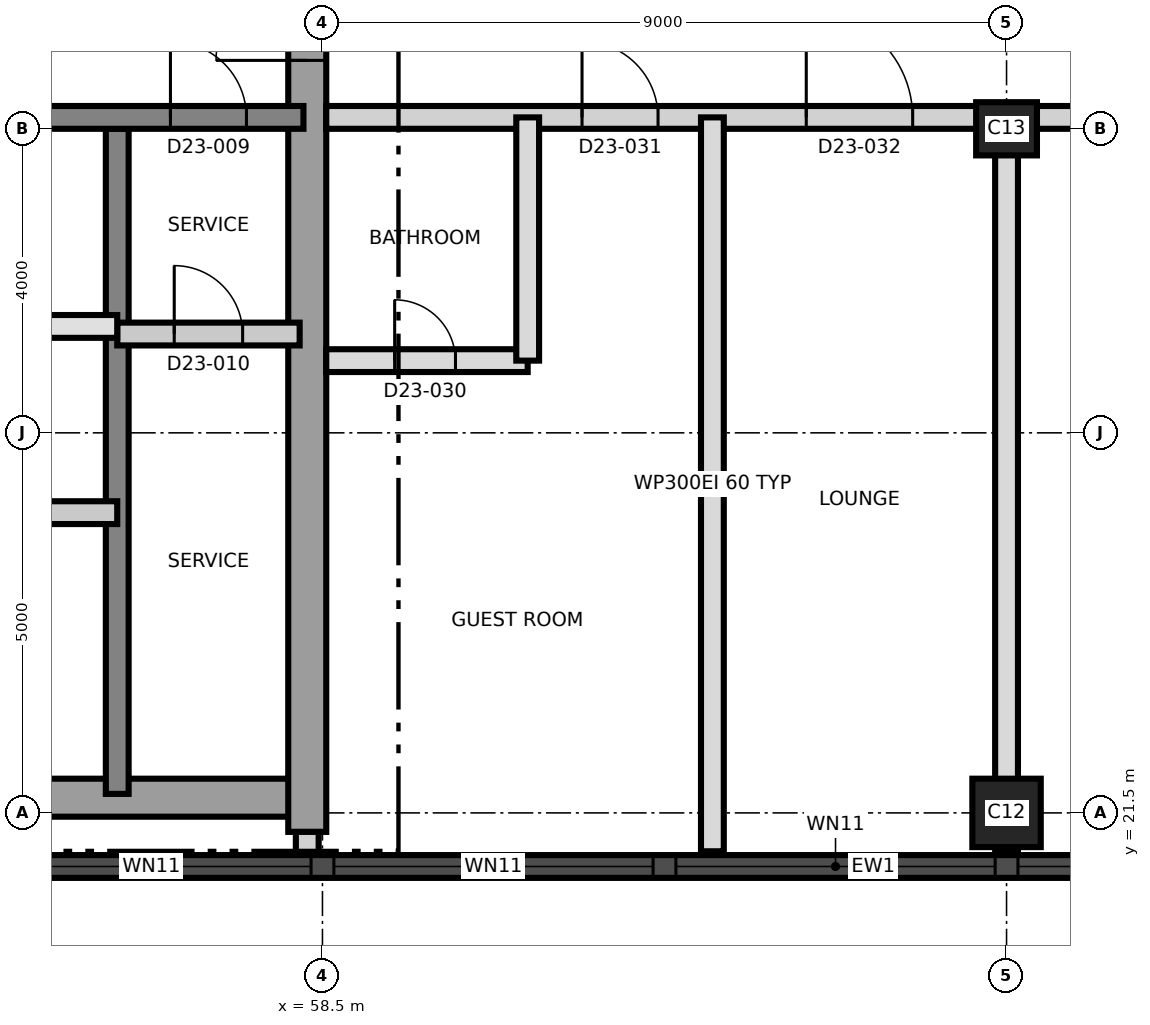
"""IFC4 building model, lengths in metres.
Left out: names, types, materials, properties, quantities, classifications, styles, units other than length and angle.
Written with IfcOpenShell. Run it as: python <this file> out.ifc"""

import sys

from ifc_helpers import new_model, si_unit, direction, frame, frame_2d, origin, origin_2d, place, context, subcontext, project, spatial, rectangle, extrude, element, fill, save


model = new_model("IFC4")
c1 = context("Model", 3, precision=1e-05, world=origin(), true_north=direction((0.0, 1.0)))
c2 = subcontext(c1, "Body", "Model", "MODEL_VIEW")
j1 = project(units=[si_unit("LENGTHUNIT", "METRE"), si_unit("PLANEANGLEUNIT", "RADIAN")], contexts=[c1])
p1 = place(None, origin())
s1 = spatial("IfcSite", under=j1, at=p1, CompositionType="ELEMENT")
p2 = place(p1, origin())
s2 = spatial("IfcBuilding", under=s1, at=p2, CompositionType="ELEMENT")
p3 = place(p2, frame((0.0, 0.0, 210.6)))
s3 = spatial("IfcBuildingStorey", under=s2, at=p3, CompositionType="ELEMENT", Elevation=210.6)
p4 = place(p3, frame((31.25, 21.7, 0.0), z_axis=(0.0, 0.0, 1.0), x_axis=(1.0, 0.0, 0.0)))
e1 = element("IfcWall", 1, at=p4, inside=s3, PredefinedType="SHEAR", context=c2, shape_type="SweptSolid", body=[
    extrude(rectangle(XDim=27.0, YDim=0.5, at=frame_2d((13.5, 0.0))), origin(), (0.0, 0.0, 1.0), 3.7),
])
p5 = place(p3, frame((58.3, 21.25, 0.0), z_axis=(0.0, 0.0, 1.0), x_axis=(0.0, 1.0, 0.0)))
e2 = element("IfcWall", 2, at=p5, inside=s3, PredefinedType="SHEAR", context=c2, shape_type="SweptSolid", body=[
    extrude(rectangle(XDim=18.5, YDim=0.5, at=frame_2d((9.25, 0.0))), origin(), (0.0, 0.0, 1.0), 3.7),
])
p6 = place(p5, frame((10.15, 0.0, 0.0)))
e3 = element("IfcOpeningElement", 3, at=p6, cuts=e2, PredefinedType="OPENING", context=c2, shape_type="SweptSolid", body=[
    extrude(rectangle(XDim=1.2, YDim=2.1, at=frame_2d((0.6, 1.05))), frame((0.0, 0.26, 0.0), z_axis=(0.0, -1.0, 0.0), x_axis=(1.0, 0.0, 0.0)), (0.0, 0.0, 1.0), 0.52),
])
p7 = place(p3, frame((55.8, 21.75, 0.0), z_axis=(0.0, 0.0, 1.0), x_axis=(0.0, 1.0, 0.0)))
e4 = element("IfcWall", 4, at=p7, inside=s3, PredefinedType="SHEAR", context=c2, shape_type="SweptSolid", body=[
    extrude(rectangle(XDim=8.75, YDim=0.3, at=frame_2d((4.375, 0.0))), origin(), (0.0, 0.0, 1.0), 3.7),
])
p8 = place(p3, frame((31.75, 30.65, 0.0), z_axis=(0.0, 0.0, 1.0), x_axis=(1.0, 0.0, 0.0)))
e5 = element("IfcWall", 5, at=p8, inside=s3, PredefinedType="SHEAR", context=c2, shape_type="SweptSolid", body=[
    extrude(rectangle(XDim=26.5, YDim=0.3, at=frame_2d((13.25, 0.0))), origin(), (0.0, 0.0, 1.0), 3.7),
])
p9 = place(p8, frame((24.75, 0.0, 0.0)))
e6 = element("IfcOpeningElement", 6, at=p9, cuts=e5, PredefinedType="OPENING", context=c2, shape_type="SweptSolid", body=[
    extrude(rectangle(XDim=1.0, YDim=2.1, at=frame_2d((0.5, 1.05))), frame((0.0, 0.16, 0.0), z_axis=(0.0, -1.0, 0.0), x_axis=(1.0, 0.0, 0.0)), (0.0, 0.0, 1.0), 0.32),
])
p10 = place(p3, frame((67.5, 21.5, 0.0), z_axis=(0.0, 0.0, 1.0), x_axis=(1.0, 0.0, 0.0)))
e7 = element("IfcColumn", 7, at=p10, inside=s3, PredefinedType="COLUMN", context=c2, shape_type="SweptSolid", body=[
    extrude(rectangle(XDim=0.9, YDim=0.9, at=origin_2d()), origin(), (0.0, 0.0, 1.0), 3.7),
])
p11 = place(p3, frame((67.5, 30.5, 0.0), z_axis=(0.0, 0.0, 1.0), x_axis=(1.0, 0.0, 0.0)))
e8 = element("IfcColumn", 8, at=p11, inside=s3, PredefinedType="COLUMN", context=c2, shape_type="SweptSolid", body=[
    extrude(rectangle(XDim=0.8, YDim=0.7, at=origin_2d()), origin(), (0.0, 0.0, 1.0), 3.7),
])
p12 = place(p3, frame((44.011, 20.795, 0.0), z_axis=(0.0, 0.0, 1.0), x_axis=(1.0, 0.0, 0.0)))
e9 = element("IfcWall", 9, at=p12, inside=s3, PredefinedType="SOLIDWALL", context=c2, shape_type="SweptSolid", body=[
    extrude(rectangle(XDim=43.476, YDim=0.3, at=frame_2d((21.738, 0.0))), origin(), (0.0, 0.0, 1.0), 3.4),
])
p13 = place(p12, frame((1.845, 0.0, 0.3)))
e10 = element("IfcOpeningElement", 10, at=p13, cuts=e9, PredefinedType="OPENING", context=c2, shape_type="SweptSolid", body=[
    extrude(rectangle(XDim=1.8, YDim=2.4, at=frame_2d((0.9, 1.2))), frame((0.0, 0.16, 0.0), z_axis=(0.0, -1.0, 0.0), x_axis=(1.0, 0.0, 0.0)), (0.0, 0.0, 1.0), 0.32),
])
p14 = place(p12, frame((5.639, 0.0, 0.9)))
e11 = element("IfcOpeningElement", 11, at=p14, cuts=e9, PredefinedType="OPENING", context=c2, shape_type="SweptSolid", body=[
    extrude(rectangle(XDim=4.2, YDim=1.5, at=frame_2d((2.1, 0.75))), frame((0.0, 0.16, 0.0), z_axis=(0.0, -1.0, 0.0), x_axis=(1.0, 0.0, 0.0)), (0.0, 0.0, 1.0), 0.32),
])
p15 = place(p12, frame((10.139, 0.0, 0.9)))
e12 = element("IfcOpeningElement", 12, at=p15, cuts=e9, PredefinedType="OPENING", context=c2, shape_type="SweptSolid", body=[
    extrude(rectangle(XDim=4.2, YDim=1.5, at=frame_2d((2.1, 0.75))), frame((0.0, 0.16, 0.0), z_axis=(0.0, -1.0, 0.0), x_axis=(1.0, 0.0, 0.0)), (0.0, 0.0, 1.0), 0.32),
])
p16 = place(p12, frame((14.639, 0.0, 0.9)))
e13 = element("IfcOpeningElement", 13, at=p16, cuts=e9, PredefinedType="OPENING", context=c2, shape_type="SweptSolid", body=[
    extrude(rectangle(XDim=4.2, YDim=1.5, at=frame_2d((2.1, 0.75))), frame((0.0, 0.16, 0.0), z_axis=(0.0, -1.0, 0.0), x_axis=(1.0, 0.0, 0.0)), (0.0, 0.0, 1.0), 0.32),
])
p17 = place(p12, frame((19.139, 0.0, 0.9)))
e14 = element("IfcOpeningElement", 14, at=p17, cuts=e9, PredefinedType="OPENING", context=c2, shape_type="SweptSolid", body=[
    extrude(rectangle(XDim=4.2, YDim=1.5, at=frame_2d((2.1, 0.75))), frame((0.0, 0.16, 0.0), z_axis=(0.0, -1.0, 0.0), x_axis=(1.0, 0.0, 0.0)), (0.0, 0.0, 1.0), 0.32),
])
p18 = place(p12, frame((23.639, 0.0, 0.9)))
e15 = element("IfcOpeningElement", 15, at=p18, cuts=e9, PredefinedType="OPENING", context=c2, shape_type="SweptSolid", body=[
    extrude(rectangle(XDim=4.2, YDim=1.5, at=frame_2d((2.1, 0.75))), frame((0.0, 0.16, 0.0), z_axis=(0.0, -1.0, 0.0), x_axis=(1.0, 0.0, 0.0)), (0.0, 0.0, 1.0), 0.32),
])
p19 = place(p12, frame((28.139, 0.0, 0.9)))
e16 = element("IfcOpeningElement", 16, at=p19, cuts=e9, PredefinedType="OPENING", context=c2, shape_type="SweptSolid", body=[
    extrude(rectangle(XDim=4.2, YDim=1.5, at=frame_2d((2.1, 0.75))), frame((0.0, 0.16, 0.0), z_axis=(0.0, -1.0, 0.0), x_axis=(1.0, 0.0, 0.0)), (0.0, 0.0, 1.0), 0.32),
])
p20 = place(p12, frame((32.639, 0.0, 0.9)))
e17 = element("IfcOpeningElement", 17, at=p20, cuts=e9, PredefinedType="OPENING", context=c2, shape_type="SweptSolid", body=[
    extrude(rectangle(XDim=4.2, YDim=1.5, at=frame_2d((2.1, 0.75))), frame((0.0, 0.16, 0.0), z_axis=(0.0, -1.0, 0.0), x_axis=(1.0, 0.0, 0.0)), (0.0, 0.0, 1.0), 0.32),
])
p21 = place(p12, frame((37.139, 0.0, 0.9)))
e18 = element("IfcOpeningElement", 18, at=p21, cuts=e9, PredefinedType="OPENING", context=c2, shape_type="SweptSolid", body=[
    extrude(rectangle(XDim=4.2, YDim=1.5, at=frame_2d((2.1, 0.75))), frame((0.0, 0.16, 0.0), z_axis=(0.0, -1.0, 0.0), x_axis=(1.0, 0.0, 0.0)), (0.0, 0.0, 1.0), 0.32),
])
p22 = place(p3, frame((49.8, 25.45, 0.0), z_axis=(0.0, 0.0, 1.0), x_axis=(1.0, 0.0, 0.0)))
e19 = element("IfcWall", 19, at=p22, inside=s3, PredefinedType="PARTITIONING", context=c2, shape_type="SweptSolid", body=[
    extrude(rectangle(XDim=6.0, YDim=0.3, at=frame_2d((3.0, 0.0))), origin(), (0.0, 0.0, 1.0), 3.4),
])
p23 = place(p22, frame((2.5, 0.0, 0.0)))
e20 = element("IfcOpeningElement", 20, at=p23, cuts=e19, PredefinedType="OPENING", context=c2, shape_type="SweptSolid", body=[
    extrude(rectangle(XDim=1.0, YDim=2.1, at=frame_2d((0.5, 1.05))), frame((0.0, 0.16, 0.0), z_axis=(0.0, -1.0, 0.0), x_axis=(1.0, 0.0, 0.0)), (0.0, 0.0, 1.0), 0.32),
])
p24 = place(p3, frame((55.8, 27.8, 0.0), z_axis=(0.0, 0.0, 1.0), x_axis=(1.0, 0.0, 0.0)))
e21 = element("IfcWall", 21, at=p24, inside=s3, PredefinedType="PARTITIONING", context=c2, shape_type="SweptSolid", body=[
    extrude(rectangle(XDim=2.4, YDim=0.3, at=frame_2d((1.2, 0.0))), origin(), (0.0, 0.0, 1.0), 3.4),
])
p25 = place(p24, frame((0.75, 0.0, 0.0)))
e22 = element("IfcOpeningElement", 22, at=p25, cuts=e21, PredefinedType="OPENING", context=c2, shape_type="SweptSolid", body=[
    extrude(rectangle(XDim=0.9, YDim=2.1, at=frame_2d((0.45, 1.05))), frame((0.0, 0.16, 0.0), z_axis=(0.0, -1.0, 0.0), x_axis=(1.0, 0.0, 0.0)), (0.0, 0.0, 1.0), 0.32),
])
p26 = place(p3, frame((49.8, 27.9, 0.0), z_axis=(0.0, 0.0, 1.0), x_axis=(1.0, 0.0, 0.0)))
e23 = element("IfcWall", 23, at=p26, inside=s3, PredefinedType="SOLIDWALL", context=c2, shape_type="SweptSolid", body=[
    extrude(rectangle(XDim=6.0, YDim=0.3, at=frame_2d((3.0, 0.0))), origin(), (0.0, 0.0, 1.0), 3.4),
])
p27 = place(p3, frame((58.55, 27.45, 0.0), z_axis=(0.0, 0.0, 1.0), x_axis=(1.0, 0.0, 0.0)))
e24 = element("IfcWall", 24, at=p27, inside=s3, PredefinedType="PARTITIONING", context=c2, shape_type="SweptSolid", body=[
    extrude(rectangle(XDim=2.65, YDim=0.3, at=frame_2d((1.325, 0.0))), origin(), (0.0, 0.0, 1.0), 3.4),
])
p28 = place(p27, frame((0.9, 0.0, 0.0)))
e25 = element("IfcOpeningElement", 25, at=p28, cuts=e24, PredefinedType="OPENING", context=c2, shape_type="SweptSolid", body=[
    extrude(rectangle(XDim=0.8, YDim=2.1, at=frame_2d((0.4, 1.05))), frame((0.0, 0.16, 0.0), z_axis=(0.0, -1.0, 0.0), x_axis=(1.0, 0.0, 0.0)), (0.0, 0.0, 1.0), 0.32),
])
p29 = place(p3, frame((58.55, 30.65, 0.0), z_axis=(0.0, 0.0, 1.0), x_axis=(1.0, 0.0, 0.0)))
e26 = element("IfcWall", 26, at=p29, inside=s3, PredefinedType="PARTITIONING", context=c2, shape_type="SweptSolid", body=[
    extrude(rectangle(XDim=26.78, YDim=0.3, at=frame_2d((13.39, 0.0))), origin(), (0.0, 0.0, 1.0), 3.4),
])
p30 = place(p29, frame((3.365, 0.0, 0.0)))
e27 = element("IfcOpeningElement", 27, at=p30, cuts=e26, PredefinedType="OPENING", context=c2, shape_type="SweptSolid", body=[
    extrude(rectangle(XDim=1.0, YDim=2.1, at=frame_2d((0.5, 1.05))), frame((0.0, 0.16, 0.0), z_axis=(0.0, -1.0, 0.0), x_axis=(1.0, 0.0, 0.0)), (0.0, 0.0, 1.0), 0.32),
])
p31 = place(p29, frame((6.315, 0.0, 0.0)))
e28 = element("IfcOpeningElement", 28, at=p31, cuts=e26, PredefinedType="OPENING", context=c2, shape_type="SweptSolid", body=[
    extrude(rectangle(XDim=1.4, YDim=2.1, at=frame_2d((0.7, 1.05))), frame((0.0, 0.16, 0.0), z_axis=(0.0, -1.0, 0.0), x_axis=(1.0, 0.0, 0.0)), (0.0, 0.0, 1.0), 0.32),
])
p32 = place(p29, frame((10.1, 0.0, 0.0)))
e29 = element("IfcOpeningElement", 29, at=p32, cuts=e26, PredefinedType="OPENING", context=c2, shape_type="SweptSolid", body=[
    extrude(rectangle(XDim=1.0, YDim=2.1, at=frame_2d((0.5, 1.05))), frame((0.0, 0.16, 0.0), z_axis=(0.0, -1.0, 0.0), x_axis=(1.0, 0.0, 0.0)), (0.0, 0.0, 1.0), 0.32),
])
p33 = place(p29, frame((15.95, 0.0, 0.0)))
e30 = element("IfcOpeningElement", 30, at=p33, cuts=e26, PredefinedType="OPENING", context=c2, shape_type="SweptSolid", body=[
    extrude(rectangle(XDim=1.0, YDim=2.1, at=frame_2d((0.5, 1.05))), frame((0.0, 0.16, 0.0), z_axis=(0.0, -1.0, 0.0), x_axis=(1.0, 0.0, 0.0)), (0.0, 0.0, 1.0), 0.32),
])
p34 = place(p29, frame((19.1, 0.0, 0.0)))
e31 = element("IfcOpeningElement", 31, at=p34, cuts=e26, PredefinedType="OPENING", context=c2, shape_type="SweptSolid", body=[
    extrude(rectangle(XDim=1.0, YDim=2.1, at=frame_2d((0.5, 1.05))), frame((0.0, 0.16, 0.0), z_axis=(0.0, -1.0, 0.0), x_axis=(1.0, 0.0, 0.0)), (0.0, 0.0, 1.0), 0.32),
])
p35 = place(p29, frame((24.95, 0.0, 0.0)))
e32 = element("IfcOpeningElement", 32, at=p35, cuts=e26, PredefinedType="OPENING", context=c2, shape_type="SweptSolid", body=[
    extrude(rectangle(XDim=1.0, YDim=2.1, at=frame_2d((0.5, 1.05))), frame((0.0, 0.16, 0.0), z_axis=(0.0, -1.0, 0.0), x_axis=(1.0, 0.0, 0.0)), (0.0, 0.0, 1.0), 0.32),
])
p36 = place(p3, frame((61.2, 27.45, 0.0), z_axis=(0.0, 0.0, 1.0), x_axis=(0.0, 1.0, 0.0)))
e33 = element("IfcWall", 33, at=p36, inside=s3, PredefinedType="PARTITIONING", context=c2, shape_type="SweptSolid", body=[
    extrude(rectangle(XDim=3.2, YDim=0.3, at=frame_2d((1.6, 0.0))), origin(), (0.0, 0.0, 1.0), 3.4),
])
for number, where, z_axis, x_axis in (
    (34, (63.63, 20.995, 0.0), (0.0, 0.0, 1.0), (0.0, 1.0, 0.0)),
    (35, (67.5, 20.995, 0.0), (0.0, 0.0, 1.0), (0.0, 1.0, 0.0)),
):
    element("IfcWall", number, at=place(p3, frame(where, z_axis=z_axis, x_axis=x_axis)), inside=s3, PredefinedType="PARTITIONING", context=c2, shape_type="SweptSolid", body=[
        extrude(rectangle(XDim=9.655, YDim=0.3, at=frame_2d((4.827, 0.0))), origin(), (0.0, 0.0, 1.0), 3.35),
    ])
p37 = place(p3, frame((58.3, 21.25, 0.0), z_axis=(0.0, 0.0, 1.0), x_axis=(0.0, -1.0, 0.0)))
e36 = element("IfcWall", 36, at=p37, inside=s3, PredefinedType="PARTITIONING", context=c2, shape_type="SweptSolid", body=[
    extrude(rectangle(XDim=0.295, YDim=0.3, at=frame_2d((0.147, 0.0))), origin(), (0.0, 0.0, 1.0), 3.4),
])
p38 = place(p15, origin())
e37 = element("IfcWindow", 37, at=p38, inside=s3, PartitioningType="SINGLE_PANEL", PredefinedType="WINDOW", context=c2, shape_type="SweptSolid", body=[
    extrude(rectangle(XDim=4.2, YDim=1.5, at=frame_2d((2.1, 0.75))), frame((0.0, 0.03, 0.0), z_axis=(0.0, -1.0, 0.0), x_axis=(1.0, 0.0, 0.0)), (0.0, 0.0, 1.0), 0.06),
])
fill(e12, e37)
p39 = place(p16, origin())
e38 = element("IfcWindow", 38, at=p39, inside=s3, PartitioningType="SINGLE_PANEL", PredefinedType="WINDOW", context=c2, shape_type="SweptSolid", body=[
    extrude(rectangle(XDim=4.2, YDim=1.5, at=frame_2d((2.1, 0.75))), frame((0.0, 0.03, 0.0), z_axis=(0.0, -1.0, 0.0), x_axis=(1.0, 0.0, 0.0)), (0.0, 0.0, 1.0), 0.06),
])
fill(e13, e38)
p40 = place(p17, origin())
e39 = element("IfcWindow", 39, at=p40, inside=s3, PartitioningType="SINGLE_PANEL", PredefinedType="WINDOW", context=c2, shape_type="SweptSolid", body=[
    extrude(rectangle(XDim=4.2, YDim=1.5, at=frame_2d((2.1, 0.75))), frame((0.0, 0.03, 0.0), z_axis=(0.0, -1.0, 0.0), x_axis=(1.0, 0.0, 0.0)), (0.0, 0.0, 1.0), 0.06),
])
fill(e14, e39)
p41 = place(p18, origin())
e40 = element("IfcWindow", 40, at=p41, inside=s3, PartitioningType="SINGLE_PANEL", PredefinedType="WINDOW", context=c2, shape_type="SweptSolid", body=[
    extrude(rectangle(XDim=4.2, YDim=1.5, at=frame_2d((2.1, 0.75))), frame((0.0, 0.03, 0.0), z_axis=(0.0, -1.0, 0.0), x_axis=(1.0, 0.0, 0.0)), (0.0, 0.0, 1.0), 0.06),
])
fill(e15, e40)
p42 = place(p9, origin())
e41 = element("IfcDoor", 41, at=p42, inside=s3, OperationType="SINGLE_SWING_LEFT", PredefinedType="DOOR", context=c2, shape_type="SweptSolid", body=[
    extrude(rectangle(XDim=1.0, YDim=2.1, at=frame_2d((0.5, 1.05))), frame((0.0, 0.025, 0.0), z_axis=(0.0, -1.0, 0.0), x_axis=(1.0, 0.0, 0.0)), (0.0, 0.0, 1.0), 0.05),
])
fill(e6, e41)
p43 = place(p25, origin())
e42 = element("IfcDoor", 42, at=p43, inside=s3, OperationType="SINGLE_SWING_RIGHT", PredefinedType="DOOR", context=c2, shape_type="SweptSolid", body=[
    extrude(rectangle(XDim=0.9, YDim=2.1, at=frame_2d((0.45, 1.05))), frame((0.0, 0.025, 0.0), z_axis=(0.0, -1.0, 0.0), x_axis=(1.0, 0.0, 0.0)), (0.0, 0.0, 1.0), 0.05),
])
fill(e22, e42)
p44 = place(p6, origin())
e43 = element("IfcDoor", 43, at=p44, inside=s3, OperationType="SINGLE_SWING_LEFT", PredefinedType="DOOR", context=c2, shape_type="SweptSolid", body=[
    extrude(rectangle(XDim=1.2, YDim=2.1, at=frame_2d((0.6, 1.05))), frame((0.0, 0.025, 0.0), z_axis=(0.0, -1.0, 0.0), x_axis=(1.0, 0.0, 0.0)), (0.0, 0.0, 1.0), 0.05),
])
fill(e3, e43)
p45 = place(p28, origin())
e44 = element("IfcDoor", 44, at=p45, inside=s3, OperationType="SINGLE_SWING_LEFT", PredefinedType="DOOR", context=c2, shape_type="SweptSolid", body=[
    extrude(rectangle(XDim=0.8, YDim=2.1, at=frame_2d((0.4, 1.05))), frame((0.0, 0.025, 0.0), z_axis=(0.0, -1.0, 0.0), x_axis=(1.0, 0.0, 0.0)), (0.0, 0.0, 1.0), 0.05),
])
fill(e25, e44)
p46 = place(p30, origin())
e45 = element("IfcDoor", 45, at=p46, inside=s3, OperationType="SINGLE_SWING_LEFT", PredefinedType="DOOR", context=c2, shape_type="SweptSolid", body=[
    extrude(rectangle(XDim=1.0, YDim=2.1, at=frame_2d((0.5, 1.05))), frame((0.0, 0.025, 0.0), z_axis=(0.0, -1.0, 0.0), x_axis=(1.0, 0.0, 0.0)), (0.0, 0.0, 1.0), 0.05),
])
fill(e27, e45)
p47 = place(p31, origin())
e46 = element("IfcDoor", 46, at=p47, inside=s3, OperationType="SINGLE_SWING_RIGHT", PredefinedType="DOOR", context=c2, shape_type="SweptSolid", body=[
    extrude(rectangle(XDim=1.4, YDim=2.1, at=frame_2d((0.7, 1.05))), frame((0.0, 0.025, 0.0), z_axis=(0.0, -1.0, 0.0), x_axis=(1.0, 0.0, 0.0)), (0.0, 0.0, 1.0), 0.05),
])
fill(e28, e46)
save(model, sys.argv[1])
